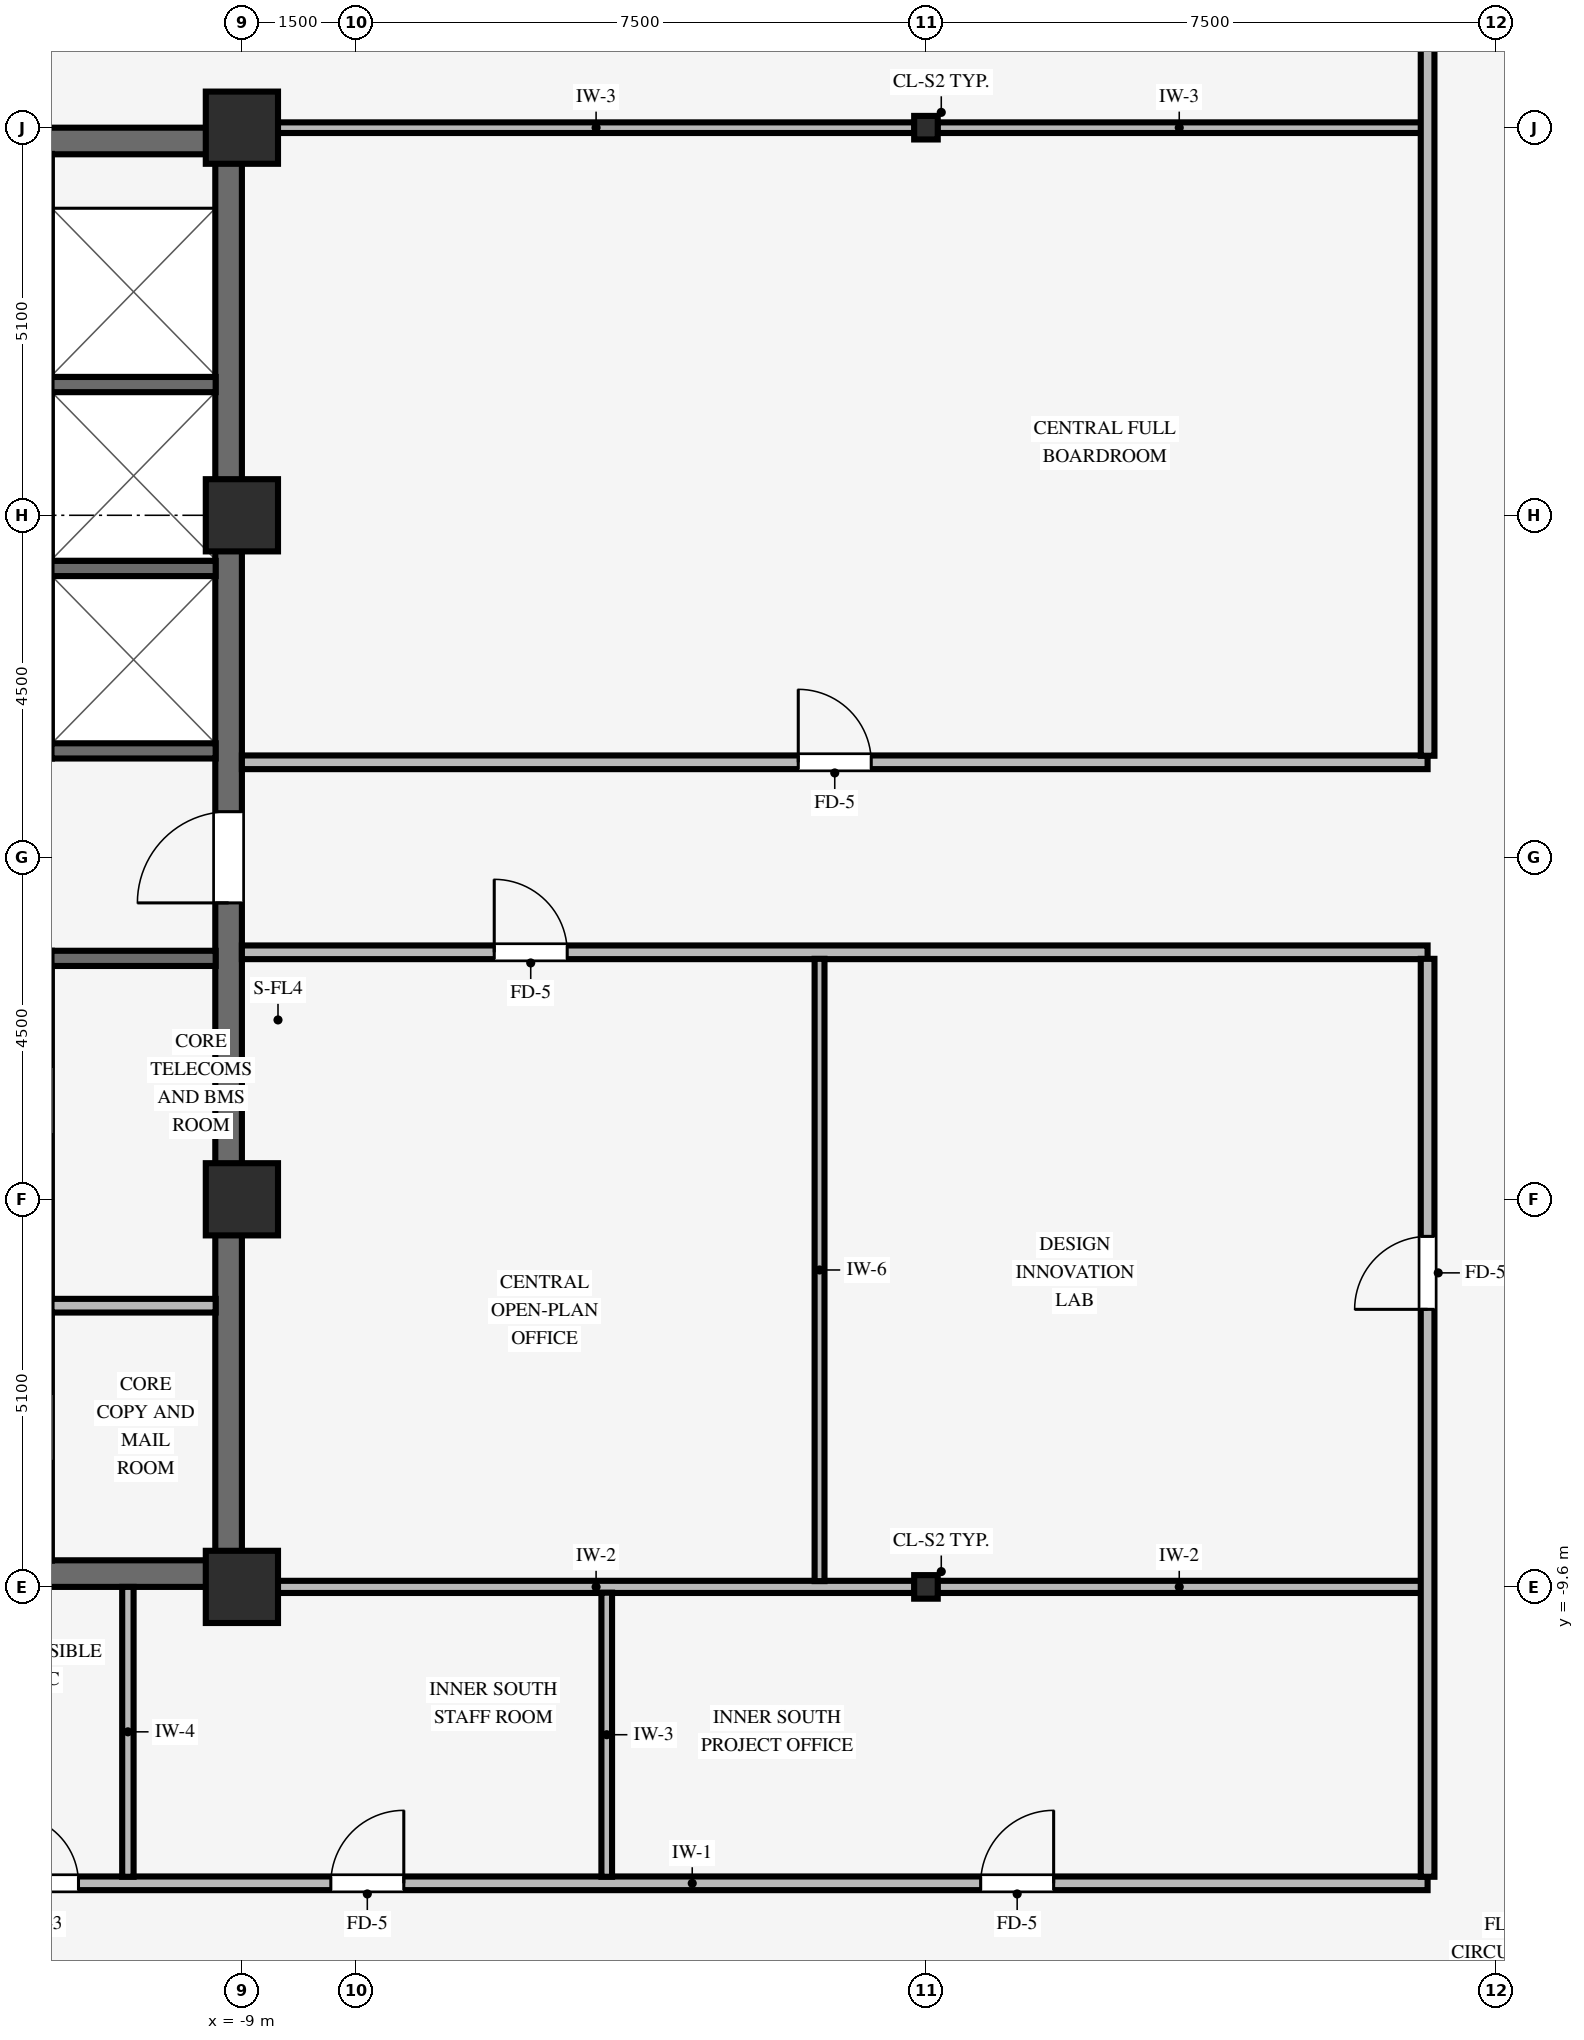
"""IFC4 building model, lengths in metres.
Left out: names, types, materials, properties, quantities, classifications, styles, units other than length and angle.
Written with IfcOpenShell. Run it as: python <this file> out.ifc"""

import sys

from ifc_helpers import new_model, si_unit, direction, frame, frame_2d, origin, origin_2d, place, context, subcontext, project, spatial, rectangle, i_section, extrude, source, transform, mapped, element, fill, save


model = new_model("IFC4")
c1 = context("Model", 3, precision=1e-05, world=origin(), true_north=direction((0.0, 1.0)))
c2 = subcontext(c1, "Body", "Model", "MODEL_VIEW")
j1 = project(units=[si_unit("LENGTHUNIT", "METRE"), si_unit("PLANEANGLEUNIT", "RADIAN")], contexts=[c1])
p1 = place(None, origin())
s1 = spatial("IfcSite", under=j1, at=p1, CompositionType="ELEMENT")
p2 = place(p1, origin())
s2 = spatial("IfcBuilding", under=s1, at=p2, CompositionType="ELEMENT")
p3 = place(p2, frame((0.0, 0.0, 205.5)))
s3 = spatial("IfcBuildingStorey", under=s2, at=p3, CompositionType="ELEMENT", Elevation=205.5)
for number, where, z_axis, x_axis in (
    (1, (-17.5, -9.425, 0.0), (0.0, 0.0, 1.0), (1.0, 0.0, 0.0)),
    (2, (-17.5, 9.425, 0.0), (0.0, 0.0, 1.0), (1.0, 0.0, 0.0)),
):
    element("IfcWall", number, at=place(p3, frame(where, z_axis=z_axis, x_axis=x_axis)), inside=s3, PredefinedType="SHEAR", context=c2, shape_type="SweptSolid", body=[
        extrude(rectangle(XDim=8.5, YDim=0.35, at=frame_2d((4.25, 0.0))), origin(), (0.0, 0.0, 1.0), 3.25),
    ])
p4 = place(p3, frame((-9.175, -9.255, 0.0), z_axis=(0.0, 0.0, 1.0), x_axis=(0.0, 1.0, 0.0)))
e3 = element("IfcWall", 3, at=p4, inside=s3, PredefinedType="SHEAR", context=c2, shape_type="SweptSolid", body=[
    extrude(rectangle(XDim=18.51, YDim=0.35, at=frame_2d((9.255, 0.0))), origin(), (0.0, 0.0, 1.0), 3.25),
])
p5 = place(p4, frame((8.655, 0.0, 0.0)))
e4 = element("IfcOpeningElement", 4, at=p5, cuts=e3, PredefinedType="OPENING", context=c2, shape_type="SweptSolid", body=[
    extrude(rectangle(XDim=1.2, YDim=2.15, at=frame_2d((0.6, 1.075))), frame((0.0, 0.185, 0.0), z_axis=(0.0, -1.0, 0.0), x_axis=(1.0, 0.0, 0.0)), (0.0, 0.0, 1.0), 0.37),
])
for number, where, z_axis, x_axis in (
    (5, (-9.0, -9.6, 0.0), (0.0, 0.0, 1.0), (1.0, 0.0, 0.0)),
    (6, (-9.0, -4.5, 0.0), (0.0, 0.0, 1.0), (1.0, 0.0, 0.0)),
    (7, (-9.0, 4.5, 0.0), (0.0, 0.0, 1.0), (1.0, 0.0, 0.0)),
    (8, (-9.0, 9.6, 0.0), (0.0, 0.0, 1.0), (1.0, 0.0, 0.0)),
):
    element("IfcColumn", number, at=place(p3, frame(where, z_axis=z_axis, x_axis=x_axis)), inside=s3, PredefinedType="COLUMN", context=c2, shape_type="SweptSolid", body=[
        extrude(rectangle(XDim=0.95, YDim=0.95, at=origin_2d()), origin(), (0.0, 0.0, 1.0), 3.25),
    ])
for number, where, z_axis, x_axis in (
    (9, (0.0, -9.6, 0.0), (0.0, 0.0, 1.0), (1.0, 0.0, 0.0)),
    (10, (0.0, 9.6, 0.0), (0.0, 0.0, 1.0), (1.0, 0.0, 0.0)),
):
    element("IfcColumn", number, at=place(p3, frame(where, z_axis=z_axis, x_axis=x_axis)), inside=s3, PredefinedType="COLUMN", context=c2, shape_type="SweptSolid", body=[
        extrude(i_section(OverallWidth=0.31, OverallDepth=0.31, WebThickness=0.015, FlangeThickness=0.015, FilletRadius=0.015, at=origin_2d()), origin(), (0.0, 0.0, 1.0), 3.25),
    ])
p6 = place(p3, frame((-11.505, -1.33, 0.0), z_axis=(0.0, 0.0, 1.0), x_axis=(1.0, 0.0, 0.0)))
e11 = element("IfcWall", 11, at=p6, inside=s3, PredefinedType="SHEAR", context=c2, shape_type="SweptSolid", body=[
    extrude(rectangle(XDim=2.16, YDim=0.2, at=frame_2d((1.08, 0.0))), origin(), (0.0, 0.0, 1.0), 3.25),
])
p7 = place(p3, frame((-11.505, -5.9, 0.0), z_axis=(0.0, 0.0, 1.0), x_axis=(1.0, 0.0, 0.0)))
e12 = element("IfcWall", 12, at=p7, inside=s3, PredefinedType="PARTITIONING", context=c2, shape_type="SweptSolid", body=[
    extrude(rectangle(XDim=2.16, YDim=0.18, at=frame_2d((1.08, 0.0))), origin(), (0.0, 0.0, 1.0), 3.24),
])
for number, where, z_axis, x_axis in (
    (13, (-11.505, 1.4, 0.0), (0.0, 0.0, 1.0), (1.0, 0.0, 0.0)),
    (14, (-11.505, 3.8, 0.0), (0.0, 0.0, 1.0), (1.0, 0.0, 0.0)),
    (15, (-11.505, 6.22, 0.0), (0.0, 0.0, 1.0), (1.0, 0.0, 0.0)),
):
    element("IfcWall", number, at=place(p3, frame(where, z_axis=z_axis, x_axis=x_axis)), inside=s3, PredefinedType="SHEAR", context=c2, shape_type="SweptSolid", body=[
        extrude(rectangle(XDim=2.16, YDim=0.2, at=frame_2d((1.08, 0.0))), origin(), (0.0, 0.0, 1.0), 3.25),
    ])
p8 = place(p3, frame((-17.7, -13.5, 0.0), z_axis=(0.0, 0.0, 1.0), x_axis=(1.0, 0.0, 0.0)))
e16 = element("IfcWall", 16, at=p8, inside=s3, PredefinedType="PARTITIONING", context=c2, shape_type="SweptSolid", body=[
    extrude(rectangle(XDim=24.3, YDim=0.18, at=frame_2d((12.15, 0.0))), origin(), (0.0, 0.0, 1.0), 2.888),
])
p9 = place(p8, frame((18.42, 0.0, 0.0)))
e17 = element("IfcOpeningElement", 17, at=p9, cuts=e16, PredefinedType="OPENING", context=c2, shape_type="SweptSolid", body=[
    extrude(rectangle(XDim=0.96, YDim=2.1, at=frame_2d((0.48, 1.05))), frame((0.0, 0.1, 0.0), z_axis=(0.0, -1.0, 0.0), x_axis=(1.0, 0.0, 0.0)), (0.0, 0.0, 1.0), 0.2),
])
p10 = place(p8, frame((9.87, 0.0, 0.0)))
e18 = element("IfcOpeningElement", 18, at=p10, cuts=e16, PredefinedType="OPENING", context=c2, shape_type="SweptSolid", body=[
    extrude(rectangle(XDim=0.96, YDim=2.1, at=frame_2d((0.48, 1.05))), frame((0.0, 0.1, 0.0), z_axis=(0.0, -1.0, 0.0), x_axis=(1.0, 0.0, 0.0)), (0.0, 0.0, 1.0), 0.2),
])
p11 = place(p8, frame((3.3, 0.0, 0.0)))
e19 = element("IfcOpeningElement", 19, at=p11, cuts=e16, PredefinedType="OPENING", context=c2, shape_type="SweptSolid", body=[
    extrude(rectangle(XDim=0.9, YDim=2.1, at=frame_2d((0.45, 1.05))), frame((0.0, 0.1, 0.0), z_axis=(0.0, -1.0, 0.0), x_axis=(1.0, 0.0, 0.0)), (0.0, 0.0, 1.0), 0.2),
])
p12 = place(p8, frame((5.65, 0.0, 0.0)))
e20 = element("IfcOpeningElement", 20, at=p12, cuts=e16, PredefinedType="OPENING", context=c2, shape_type="SweptSolid", body=[
    extrude(rectangle(XDim=0.9, YDim=2.1, at=frame_2d((0.45, 1.05))), frame((0.0, 0.1, 0.0), z_axis=(0.0, -1.0, 0.0), x_axis=(1.0, 0.0, 0.0)), (0.0, 0.0, 1.0), 0.2),
])
p13 = place(p3, frame((-8.529, -9.6, 0.0), z_axis=(0.0, 0.0, 1.0), x_axis=(1.0, 0.0, 0.0)))
e21 = element("IfcWall", 21, at=p13, inside=s3, PredefinedType="PARTITIONING", context=c2, shape_type="SweptSolid", body=[
    extrude(rectangle(XDim=8.378, YDim=0.16, at=frame_2d((4.189, 0.0))), origin(), (0.0, 0.0, 1.0), 2.285),
])
p14 = place(p3, frame((0.151, -9.6, 0.0), z_axis=(0.0, 0.0, 1.0), x_axis=(1.0, 0.0, 0.0)))
e22 = element("IfcWall", 22, at=p14, inside=s3, PredefinedType="PARTITIONING", context=c2, shape_type="SweptSolid", body=[
    extrude(rectangle(XDim=6.363, YDim=0.16, at=frame_2d((3.182, 0.0))), origin(), (0.0, 0.0, 1.0), 2.285),
])
p15 = place(p3, frame((-9.0, -1.25, 0.0), z_axis=(0.0, 0.0, 1.0), x_axis=(1.0, 0.0, 0.0)))
e23 = element("IfcWall", 23, at=p15, inside=s3, PredefinedType="PARTITIONING", context=c2, shape_type="SweptSolid", body=[
    extrude(rectangle(XDim=15.6, YDim=0.18, at=frame_2d((7.8, 0.0))), origin(), (0.0, 0.0, 1.0), 3.24),
])
p16 = place(p15, frame((3.32, 0.0, 0.0)))
e24 = element("IfcOpeningElement", 24, at=p16, cuts=e23, PredefinedType="OPENING", context=c2, shape_type="SweptSolid", body=[
    extrude(rectangle(XDim=0.96, YDim=2.1, at=frame_2d((0.48, 1.05))), frame((0.0, 0.1, 0.0), z_axis=(0.0, -1.0, 0.0), x_axis=(1.0, 0.0, 0.0)), (0.0, 0.0, 1.0), 0.2),
])
p17 = place(p3, frame((-9.0, 1.25, 0.0), z_axis=(0.0, 0.0, 1.0), x_axis=(1.0, 0.0, 0.0)))
e25 = element("IfcWall", 25, at=p17, inside=s3, PredefinedType="PARTITIONING", context=c2, shape_type="SweptSolid", body=[
    extrude(rectangle(XDim=15.6, YDim=0.18, at=frame_2d((7.8, 0.0))), origin(), (0.0, 0.0, 1.0), 3.24),
])
p18 = place(p17, frame((7.32, 0.0, 0.0)))
e26 = element("IfcOpeningElement", 26, at=p18, cuts=e25, PredefinedType="OPENING", context=c2, shape_type="SweptSolid", body=[
    extrude(rectangle(XDim=0.96, YDim=2.1, at=frame_2d((0.48, 1.05))), frame((0.0, 0.1, 0.0), z_axis=(0.0, -1.0, 0.0), x_axis=(1.0, 0.0, 0.0)), (0.0, 0.0, 1.0), 0.2),
])
p19 = place(p3, frame((-8.529, 9.6, 0.0), z_axis=(0.0, 0.0, 1.0), x_axis=(1.0, 0.0, 0.0)))
e27 = element("IfcWall", 27, at=p19, inside=s3, PredefinedType="PARTITIONING", context=c2, shape_type="SweptSolid", body=[
    extrude(rectangle(XDim=8.378, YDim=0.14, at=frame_2d((4.189, 0.0))), origin(), (0.0, 0.0, 1.0), 2.285),
])
p20 = place(p3, frame((0.151, 9.6, 0.0), z_axis=(0.0, 0.0, 1.0), x_axis=(1.0, 0.0, 0.0)))
e28 = element("IfcWall", 28, at=p20, inside=s3, PredefinedType="PARTITIONING", context=c2, shape_type="SweptSolid", body=[
    extrude(rectangle(XDim=6.363, YDim=0.14, at=frame_2d((3.182, 0.0))), origin(), (0.0, 0.0, 1.0), 2.285),
])
p21 = place(p3, frame((-10.5, -13.414, 0.0), z_axis=(0.0, 0.0, 1.0), x_axis=(0.0, 1.0, 0.0)))
e29 = element("IfcWall", 29, at=p21, inside=s3, PredefinedType="PARTITIONING", context=c2, shape_type="SweptSolid", body=[
    extrude(rectangle(XDim=3.814, YDim=0.15, at=frame_2d((1.907, 0.0))), origin(), (0.0, 0.0, 1.0), 3.24),
])
p22 = place(p3, frame((-4.2, -13.414, 0.0), z_axis=(0.0, 0.0, 1.0), x_axis=(0.0, 1.0, 0.0)))
e30 = element("IfcWall", 30, at=p22, inside=s3, PredefinedType="PARTITIONING", context=c2, shape_type="SweptSolid", body=[
    extrude(rectangle(XDim=3.738, YDim=0.14, at=frame_2d((1.869, 0.0))), origin(), (0.0, 0.0, 1.0), 3.24),
])
p23 = place(p3, frame((-1.4, -9.524, 0.0), z_axis=(0.0, 0.0, 1.0), x_axis=(0.0, 1.0, 0.0)))
e31 = element("IfcWall", 31, at=p23, inside=s3, PredefinedType="PARTITIONING", context=c2, shape_type="SweptSolid", body=[
    extrude(rectangle(XDim=8.188, YDim=0.13, at=frame_2d((4.094, 0.0))), origin(), (0.0, 0.0, 1.0), 3.24),
])
p24 = place(p3, frame((6.6, -13.414, 0.0), z_axis=(0.0, 0.0, 1.0), x_axis=(0.0, 1.0, 0.0)))
e32 = element("IfcWall", 32, at=p24, inside=s3, PredefinedType="PARTITIONING", context=c2, shape_type="SweptSolid", body=[
    extrude(rectangle(XDim=12.078, YDim=0.18, at=frame_2d((6.039, 0.0))), origin(), (0.0, 0.0, 1.0), 3.24),
])
p25 = place(p24, frame((7.466, 0.0, 0.0)))
e33 = element("IfcOpeningElement", 33, at=p25, cuts=e32, PredefinedType="OPENING", context=c2, shape_type="SweptSolid", body=[
    extrude(rectangle(XDim=0.96, YDim=2.1, at=frame_2d((0.48, 1.05))), frame((0.0, 0.1, 0.0), z_axis=(0.0, -1.0, 0.0), x_axis=(1.0, 0.0, 0.0)), (0.0, 0.0, 1.0), 0.2),
])
p26 = place(p3, frame((6.6, 1.336, 0.0), z_axis=(0.0, 0.0, 1.0), x_axis=(0.0, 1.0, 0.0)))
e34 = element("IfcWall", 34, at=p26, inside=s3, PredefinedType="PARTITIONING", context=c2, shape_type="SweptSolid", body=[
    extrude(rectangle(XDim=12.078, YDim=0.18, at=frame_2d((6.039, 0.0))), origin(), (0.0, 0.0, 1.0), 3.24),
])
m1 = source(origin(), c2, "Body", "SweptSolid", [
    extrude(rectangle(XDim=1.2, YDim=2.15, at=frame_2d((0.6, 1.075))), frame((0.0, 0.025, 0.0), z_axis=(0.0, -1.0, 0.0), x_axis=(1.0, 0.0, 0.0)), (0.0, 0.0, 1.0), 0.05),
])
p27 = place(p5, origin())
e35 = element("IfcDoor", 35, at=p27, inside=s3, OperationType="SINGLE_SWING_LEFT", PredefinedType="DOOR", context=c2, shape_type="MappedRepresentation", body=[
    mapped(m1, transform((0.0, 0.0, 0.0), scale=1.0)),
])
fill(e4, e35)
m2 = source(origin(), c2, "Body", "SweptSolid", [
    extrude(rectangle(XDim=0.96, YDim=2.1, at=frame_2d((0.48, 1.05))), frame((0.0, 0.025, 0.0), z_axis=(0.0, -1.0, 0.0), x_axis=(1.0, 0.0, 0.0)), (0.0, 0.0, 1.0), 0.05),
])
p28 = place(p18, origin())
e36 = element("IfcDoor", 36, at=p28, inside=s3, OperationType="SINGLE_SWING_LEFT", PredefinedType="DOOR", context=c2, shape_type="MappedRepresentation", body=[
    mapped(m2, transform((0.0, 0.0, 0.0), scale=1.0)),
])
fill(e26, e36)
p29 = place(p9, origin())
e37 = element("IfcDoor", 37, at=p29, inside=s3, OperationType="SINGLE_SWING_RIGHT", PredefinedType="DOOR", context=c2, shape_type="MappedRepresentation", body=[
    mapped(m2, transform((0.0, 0.0, 0.0), scale=1.0)),
])
fill(e17, e37)
p30 = place(p25, origin())
e38 = element("IfcDoor", 38, at=p30, inside=s3, OperationType="SINGLE_SWING_LEFT", PredefinedType="DOOR", context=c2, shape_type="MappedRepresentation", body=[
    mapped(m2, transform((0.0, 0.0, 0.0), scale=1.0)),
])
fill(e33, e38)
p31 = place(p16, origin())
e39 = element("IfcDoor", 39, at=p31, inside=s3, OperationType="SINGLE_SWING_LEFT", PredefinedType="DOOR", context=c2, shape_type="MappedRepresentation", body=[
    mapped(m2, transform((0.0, 0.0, 0.0), scale=1.0)),
])
fill(e24, e39)
p32 = place(p10, origin())
e40 = element("IfcDoor", 40, at=p32, inside=s3, OperationType="SINGLE_SWING_RIGHT", PredefinedType="DOOR", context=c2, shape_type="MappedRepresentation", body=[
    mapped(m2, transform((0.0, 0.0, 0.0), scale=1.0)),
])
fill(e18, e40)
m3 = source(origin(), c2, "Body", "SweptSolid", [
    extrude(rectangle(XDim=0.9, YDim=2.1, at=frame_2d((0.45, 1.05))), frame((0.0, 0.025, 0.0), z_axis=(0.0, -1.0, 0.0), x_axis=(1.0, 0.0, 0.0)), (0.0, 0.0, 1.0), 0.05),
])
p33 = place(p12, origin())
e41 = element("IfcDoor", 41, at=p33, inside=s3, OperationType="SINGLE_SWING_LEFT", PredefinedType="DOOR", context=c2, shape_type="MappedRepresentation", body=[
    mapped(m3, transform((0.0, 0.0, 0.0), scale=1.0)),
])
fill(e20, e41)
save(model, sys.argv[1])
